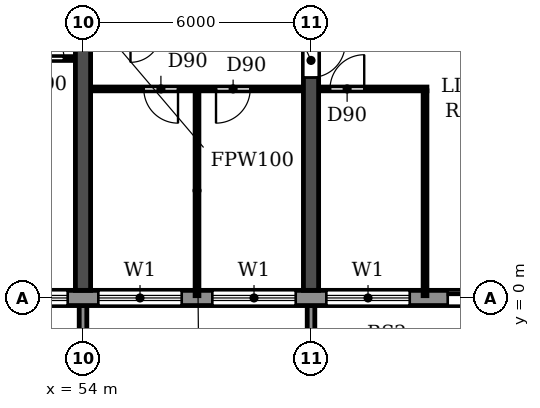
"""IFC4 building model, lengths in metres.
Left out: names, types, materials, properties, quantities, classifications, styles, units other than length and angle.
Written with IfcOpenShell. Run it as: python <this file> out.ifc"""

import sys

from ifc_helpers import new_model, si_unit, direction, frame, frame_2d, origin, place, context, subcontext, project, spatial, polyline, rectangle, outline, extrude, source, transform, mapped, element, fill, save


model = new_model("IFC4")
c1 = context("Model", 3, precision=1e-05, world=origin(), true_north=direction((0.0, 1.0)))
c2 = subcontext(c1, "Body", "Model", "MODEL_VIEW")
j1 = project(units=[si_unit("LENGTHUNIT", "METRE"), si_unit("PLANEANGLEUNIT", "RADIAN")], contexts=[c1])
p1 = place(None, origin())
s1 = spatial("IfcSite", under=j1, at=p1, CompositionType="ELEMENT")
p2 = place(p1, origin())
s2 = spatial("IfcBuilding", under=s1, at=p2, CompositionType="ELEMENT")
p3 = place(p2, frame((0.0, 0.0, 23.4)))
s3 = spatial("IfcBuildingStorey", under=s2, at=p3, CompositionType="ELEMENT", Elevation=23.4)
p4 = place(p3, frame((54.0, 0.2, 0.0), z_axis=(0.0, 0.0, 1.0), x_axis=(0.0, 1.0, 0.0)))
e1 = element("IfcWall", 1, at=p4, inside=s3, PredefinedType="SHEAR", context=c2, shape_type="SweptSolid", body=[
    extrude(rectangle(XDim=11.65, YDim=0.4, at=frame_2d((5.825, 0.0))), origin(), (0.0, 0.0, 1.0), 3.05),
])
p5 = place(p3, frame((60.0, 0.2, 0.0), z_axis=(0.0, 0.0, 1.0), x_axis=(0.0, 1.0, 0.0)))
e2 = element("IfcWall", 2, at=p5, inside=s3, PredefinedType="SHEAR", context=c2, shape_type="SweptSolid", body=[
    extrude(rectangle(XDim=11.65, YDim=0.4, at=frame_2d((5.825, 0.0))), origin(), (0.0, 0.0, 1.0), 3.05),
])
p6 = place(p5, frame((5.6, 0.0, 0.0)))
e3 = element("IfcOpeningElement", 3, at=p6, cuts=e2, PredefinedType="OPENING", context=c2, shape_type="SweptSolid", body=[
    extrude(rectangle(XDim=0.9, YDim=2.1, at=frame_2d((0.45, 1.05))), frame((0.0, 0.21, 0.0), z_axis=(0.0, -1.0, 0.0), x_axis=(1.0, 0.0, 0.0)), (0.0, 0.0, 1.0), 0.42),
])
p7 = place(p3, frame((4.683, 0.0, 0.0), z_axis=(0.0, 0.0, 1.0), x_axis=(1.0, 0.0, 0.0)))
e4 = element("IfcWall", 4, at=p7, inside=s3, PredefinedType="STANDARD", context=c2, shape_type="SweptSolid", body=[
    extrude(rectangle(XDim=92.634, YDim=0.4, at=frame_2d((46.317, 0.0))), origin(), (0.0, 0.0, 1.0), 3.05),
])
p8 = place(p7, frame((1.717, 0.0, 0.9)))
e5 = element("IfcOpeningElement", 5, at=p8, cuts=e4, PredefinedType="OPENING", context=c2, shape_type="SweptSolid", body=[
    extrude(rectangle(XDim=2.2, YDim=1.5, at=frame_2d((1.1, 0.75))), frame((0.0, 0.21, 0.0), z_axis=(0.0, -1.0, 0.0), x_axis=(1.0, 0.0, 0.0)), (0.0, 0.0, 1.0), 0.42),
])
p9 = place(p7, frame((4.717, 0.0, 0.9)))
e6 = element("IfcOpeningElement", 6, at=p9, cuts=e4, PredefinedType="OPENING", context=c2, shape_type="SweptSolid", body=[
    extrude(rectangle(XDim=2.2, YDim=1.5, at=frame_2d((1.1, 0.75))), frame((0.0, 0.21, 0.0), z_axis=(0.0, -1.0, 0.0), x_axis=(1.0, 0.0, 0.0)), (0.0, 0.0, 1.0), 0.42),
])
p10 = place(p7, frame((7.717, 0.0, 0.9)))
e7 = element("IfcOpeningElement", 7, at=p10, cuts=e4, PredefinedType="OPENING", context=c2, shape_type="SweptSolid", body=[
    extrude(rectangle(XDim=2.2, YDim=1.5, at=frame_2d((1.1, 0.75))), frame((0.0, 0.21, 0.0), z_axis=(0.0, -1.0, 0.0), x_axis=(1.0, 0.0, 0.0)), (0.0, 0.0, 1.0), 0.42),
])
p11 = place(p7, frame((10.717, 0.0, 0.9)))
e8 = element("IfcOpeningElement", 8, at=p11, cuts=e4, PredefinedType="OPENING", context=c2, shape_type="SweptSolid", body=[
    extrude(rectangle(XDim=2.2, YDim=1.5, at=frame_2d((1.1, 0.75))), frame((0.0, 0.21, 0.0), z_axis=(0.0, -1.0, 0.0), x_axis=(1.0, 0.0, 0.0)), (0.0, 0.0, 1.0), 0.42),
])
p12 = place(p7, frame((13.717, 0.0, 0.9)))
e9 = element("IfcOpeningElement", 9, at=p12, cuts=e4, PredefinedType="OPENING", context=c2, shape_type="SweptSolid", body=[
    extrude(rectangle(XDim=2.2, YDim=1.5, at=frame_2d((1.1, 0.75))), frame((0.0, 0.21, 0.0), z_axis=(0.0, -1.0, 0.0), x_axis=(1.0, 0.0, 0.0)), (0.0, 0.0, 1.0), 0.42),
])
p13 = place(p7, frame((16.717, 0.0, 0.9)))
e10 = element("IfcOpeningElement", 10, at=p13, cuts=e4, PredefinedType="OPENING", context=c2, shape_type="SweptSolid", body=[
    extrude(rectangle(XDim=2.2, YDim=1.5, at=frame_2d((1.1, 0.75))), frame((0.0, 0.21, 0.0), z_axis=(0.0, -1.0, 0.0), x_axis=(1.0, 0.0, 0.0)), (0.0, 0.0, 1.0), 0.42),
])
p14 = place(p7, frame((19.917, 0.0, 0.0)))
e11 = element("IfcOpeningElement", 11, at=p14, cuts=e4, PredefinedType="OPENING", context=c2, shape_type="SweptSolid", body=[
    extrude(rectangle(XDim=1.8, YDim=2.4, at=frame_2d((0.9, 1.2))), frame((0.0, 0.21, 0.0), z_axis=(0.0, -1.0, 0.0), x_axis=(1.0, 0.0, 0.0)), (0.0, 0.0, 1.0), 0.42),
])
p15 = place(p7, frame((22.717, 0.0, 0.9)))
e12 = element("IfcOpeningElement", 12, at=p15, cuts=e4, PredefinedType="OPENING", context=c2, shape_type="SweptSolid", body=[
    extrude(rectangle(XDim=2.2, YDim=1.5, at=frame_2d((1.1, 0.75))), frame((0.0, 0.21, 0.0), z_axis=(0.0, -1.0, 0.0), x_axis=(1.0, 0.0, 0.0)), (0.0, 0.0, 1.0), 0.42),
])
p16 = place(p7, frame((25.717, 0.0, 0.9)))
e13 = element("IfcOpeningElement", 13, at=p16, cuts=e4, PredefinedType="OPENING", context=c2, shape_type="SweptSolid", body=[
    extrude(rectangle(XDim=2.2, YDim=1.5, at=frame_2d((1.1, 0.75))), frame((0.0, 0.21, 0.0), z_axis=(0.0, -1.0, 0.0), x_axis=(1.0, 0.0, 0.0)), (0.0, 0.0, 1.0), 0.42),
])
p17 = place(p7, frame((28.717, 0.0, 0.9)))
e14 = element("IfcOpeningElement", 14, at=p17, cuts=e4, PredefinedType="OPENING", context=c2, shape_type="SweptSolid", body=[
    extrude(rectangle(XDim=2.2, YDim=1.5, at=frame_2d((1.1, 0.75))), frame((0.0, 0.21, 0.0), z_axis=(0.0, -1.0, 0.0), x_axis=(1.0, 0.0, 0.0)), (0.0, 0.0, 1.0), 0.42),
])
p18 = place(p7, frame((31.917, 0.0, 0.0)))
e15 = element("IfcOpeningElement", 15, at=p18, cuts=e4, PredefinedType="OPENING", context=c2, shape_type="SweptSolid", body=[
    extrude(rectangle(XDim=1.8, YDim=2.4, at=frame_2d((0.9, 1.2))), frame((0.0, 0.21, 0.0), z_axis=(0.0, -1.0, 0.0), x_axis=(1.0, 0.0, 0.0)), (0.0, 0.0, 1.0), 0.42),
])
p19 = place(p7, frame((34.717, 0.0, 0.9)))
e16 = element("IfcOpeningElement", 16, at=p19, cuts=e4, PredefinedType="OPENING", context=c2, shape_type="SweptSolid", body=[
    extrude(rectangle(XDim=2.2, YDim=1.5, at=frame_2d((1.1, 0.75))), frame((0.0, 0.21, 0.0), z_axis=(0.0, -1.0, 0.0), x_axis=(1.0, 0.0, 0.0)), (0.0, 0.0, 1.0), 0.42),
])
p20 = place(p7, frame((37.717, 0.0, 0.9)))
e17 = element("IfcOpeningElement", 17, at=p20, cuts=e4, PredefinedType="OPENING", context=c2, shape_type="SweptSolid", body=[
    extrude(rectangle(XDim=2.2, YDim=1.5, at=frame_2d((1.1, 0.75))), frame((0.0, 0.21, 0.0), z_axis=(0.0, -1.0, 0.0), x_axis=(1.0, 0.0, 0.0)), (0.0, 0.0, 1.0), 0.42),
])
p21 = place(p7, frame((40.717, 0.0, 0.9)))
e18 = element("IfcOpeningElement", 18, at=p21, cuts=e4, PredefinedType="OPENING", context=c2, shape_type="SweptSolid", body=[
    extrude(rectangle(XDim=2.2, YDim=1.5, at=frame_2d((1.1, 0.75))), frame((0.0, 0.21, 0.0), z_axis=(0.0, -1.0, 0.0), x_axis=(1.0, 0.0, 0.0)), (0.0, 0.0, 1.0), 0.42),
])
p22 = place(p7, frame((43.917, 0.0, 0.0)))
e19 = element("IfcOpeningElement", 19, at=p22, cuts=e4, PredefinedType="OPENING", context=c2, shape_type="SweptSolid", body=[
    extrude(rectangle(XDim=1.8, YDim=2.4, at=frame_2d((0.9, 1.2))), frame((0.0, 0.21, 0.0), z_axis=(0.0, -1.0, 0.0), x_axis=(1.0, 0.0, 0.0)), (0.0, 0.0, 1.0), 0.42),
])
p23 = place(p7, frame((46.717, 0.0, 0.9)))
e20 = element("IfcOpeningElement", 20, at=p23, cuts=e4, PredefinedType="OPENING", context=c2, shape_type="SweptSolid", body=[
    extrude(rectangle(XDim=2.2, YDim=1.5, at=frame_2d((1.1, 0.75))), frame((0.0, 0.21, 0.0), z_axis=(0.0, -1.0, 0.0), x_axis=(1.0, 0.0, 0.0)), (0.0, 0.0, 1.0), 0.42),
])
p24 = place(p7, frame((49.717, 0.0, 0.9)))
e21 = element("IfcOpeningElement", 21, at=p24, cuts=e4, PredefinedType="OPENING", context=c2, shape_type="SweptSolid", body=[
    extrude(rectangle(XDim=2.2, YDim=1.5, at=frame_2d((1.1, 0.75))), frame((0.0, 0.21, 0.0), z_axis=(0.0, -1.0, 0.0), x_axis=(1.0, 0.0, 0.0)), (0.0, 0.0, 1.0), 0.42),
])
p25 = place(p7, frame((52.717, 0.0, 0.9)))
e22 = element("IfcOpeningElement", 22, at=p25, cuts=e4, PredefinedType="OPENING", context=c2, shape_type="SweptSolid", body=[
    extrude(rectangle(XDim=2.2, YDim=1.5, at=frame_2d((1.1, 0.75))), frame((0.0, 0.21, 0.0), z_axis=(0.0, -1.0, 0.0), x_axis=(1.0, 0.0, 0.0)), (0.0, 0.0, 1.0), 0.42),
])
p26 = place(p7, frame((55.717, 0.0, 0.9)))
e23 = element("IfcOpeningElement", 23, at=p26, cuts=e4, PredefinedType="OPENING", context=c2, shape_type="SweptSolid", body=[
    extrude(rectangle(XDim=2.2, YDim=1.5, at=frame_2d((1.1, 0.75))), frame((0.0, 0.21, 0.0), z_axis=(0.0, -1.0, 0.0), x_axis=(1.0, 0.0, 0.0)), (0.0, 0.0, 1.0), 0.42),
])
p27 = place(p7, frame((58.917, 0.0, 0.0)))
e24 = element("IfcOpeningElement", 24, at=p27, cuts=e4, PredefinedType="OPENING", context=c2, shape_type="SweptSolid", body=[
    extrude(rectangle(XDim=1.8, YDim=2.4, at=frame_2d((0.9, 1.2))), frame((0.0, 0.21, 0.0), z_axis=(0.0, -1.0, 0.0), x_axis=(1.0, 0.0, 0.0)), (0.0, 0.0, 1.0), 0.42),
])
p28 = place(p7, frame((61.717, 0.0, 0.9)))
e25 = element("IfcOpeningElement", 25, at=p28, cuts=e4, PredefinedType="OPENING", context=c2, shape_type="SweptSolid", body=[
    extrude(rectangle(XDim=2.2, YDim=1.5, at=frame_2d((1.1, 0.75))), frame((0.0, 0.21, 0.0), z_axis=(0.0, -1.0, 0.0), x_axis=(1.0, 0.0, 0.0)), (0.0, 0.0, 1.0), 0.42),
])
p29 = place(p7, frame((64.717, 0.0, 0.9)))
e26 = element("IfcOpeningElement", 26, at=p29, cuts=e4, PredefinedType="OPENING", context=c2, shape_type="SweptSolid", body=[
    extrude(rectangle(XDim=2.2, YDim=1.5, at=frame_2d((1.1, 0.75))), frame((0.0, 0.21, 0.0), z_axis=(0.0, -1.0, 0.0), x_axis=(1.0, 0.0, 0.0)), (0.0, 0.0, 1.0), 0.42),
])
p30 = place(p7, frame((67.717, 0.0, 0.9)))
e27 = element("IfcOpeningElement", 27, at=p30, cuts=e4, PredefinedType="OPENING", context=c2, shape_type="SweptSolid", body=[
    extrude(rectangle(XDim=2.2, YDim=1.5, at=frame_2d((1.1, 0.75))), frame((0.0, 0.21, 0.0), z_axis=(0.0, -1.0, 0.0), x_axis=(1.0, 0.0, 0.0)), (0.0, 0.0, 1.0), 0.42),
])
p31 = place(p7, frame((70.917, 0.0, 0.0)))
e28 = element("IfcOpeningElement", 28, at=p31, cuts=e4, PredefinedType="OPENING", context=c2, shape_type="SweptSolid", body=[
    extrude(rectangle(XDim=1.8, YDim=2.4, at=frame_2d((0.9, 1.2))), frame((0.0, 0.21, 0.0), z_axis=(0.0, -1.0, 0.0), x_axis=(1.0, 0.0, 0.0)), (0.0, 0.0, 1.0), 0.42),
])
p32 = place(p7, frame((73.717, 0.0, 0.9)))
e29 = element("IfcOpeningElement", 29, at=p32, cuts=e4, PredefinedType="OPENING", context=c2, shape_type="SweptSolid", body=[
    extrude(rectangle(XDim=2.2, YDim=1.5, at=frame_2d((1.1, 0.75))), frame((0.0, 0.21, 0.0), z_axis=(0.0, -1.0, 0.0), x_axis=(1.0, 0.0, 0.0)), (0.0, 0.0, 1.0), 0.42),
])
p33 = place(p7, frame((76.717, 0.0, 0.9)))
e30 = element("IfcOpeningElement", 30, at=p33, cuts=e4, PredefinedType="OPENING", context=c2, shape_type="SweptSolid", body=[
    extrude(rectangle(XDim=2.2, YDim=1.5, at=frame_2d((1.1, 0.75))), frame((0.0, 0.21, 0.0), z_axis=(0.0, -1.0, 0.0), x_axis=(1.0, 0.0, 0.0)), (0.0, 0.0, 1.0), 0.42),
])
p34 = place(p7, frame((79.717, 0.0, 0.9)))
e31 = element("IfcOpeningElement", 31, at=p34, cuts=e4, PredefinedType="OPENING", context=c2, shape_type="SweptSolid", body=[
    extrude(rectangle(XDim=2.2, YDim=1.5, at=frame_2d((1.1, 0.75))), frame((0.0, 0.21, 0.0), z_axis=(0.0, -1.0, 0.0), x_axis=(1.0, 0.0, 0.0)), (0.0, 0.0, 1.0), 0.42),
])
p35 = place(p7, frame((82.717, 0.0, 0.9)))
e32 = element("IfcOpeningElement", 32, at=p35, cuts=e4, PredefinedType="OPENING", context=c2, shape_type="SweptSolid", body=[
    extrude(rectangle(XDim=2.2, YDim=1.5, at=frame_2d((1.1, 0.75))), frame((0.0, 0.21, 0.0), z_axis=(0.0, -1.0, 0.0), x_axis=(1.0, 0.0, 0.0)), (0.0, 0.0, 1.0), 0.42),
])
p36 = place(p7, frame((85.717, 0.0, 0.9)))
e33 = element("IfcOpeningElement", 33, at=p36, cuts=e4, PredefinedType="OPENING", context=c2, shape_type="SweptSolid", body=[
    extrude(rectangle(XDim=2.2, YDim=1.5, at=frame_2d((1.1, 0.75))), frame((0.0, 0.21, 0.0), z_axis=(0.0, -1.0, 0.0), x_axis=(1.0, 0.0, 0.0)), (0.0, 0.0, 1.0), 0.42),
])
p37 = place(p7, frame((88.717, 0.0, 0.9)))
e34 = element("IfcOpeningElement", 34, at=p37, cuts=e4, PredefinedType="OPENING", context=c2, shape_type="SweptSolid", body=[
    extrude(rectangle(XDim=2.2, YDim=1.5, at=frame_2d((1.1, 0.75))), frame((0.0, 0.21, 0.0), z_axis=(0.0, -1.0, 0.0), x_axis=(1.0, 0.0, 0.0)), (0.0, 0.0, 1.0), 0.42),
])
m1 = source(origin(), c2, "Body", "SweptSolid", [
    extrude(outline(polyline([(0.0, 0.0), (0.2, 0.0), (0.2, 1.65), (0.0, 1.65), (0.0, 0.0)])), origin(), (0.0, 0.0, 1.0), 3.1),
])
for number, where in (
    (35, (53.9, -1.85, 0.0)),
    (36, (59.9, -1.85, 0.0)),
):
    element("IfcWall", number, at=place(p3, frame(where)), inside=s3, PredefinedType="STANDARD", context=c2, shape_type="MappedRepresentation", body=[
        mapped(m1, transform((0.0, 0.0, 0.0))),
    ])
p38 = place(p3, frame((54.21, 5.5, 0.0), z_axis=(0.0, 0.0, 1.0), x_axis=(1.0, 0.0, 0.0)))
e37 = element("IfcWall", 37, at=p38, inside=s3, PredefinedType="PARTITIONING", context=c2, shape_type="SweptSolid", body=[
    extrude(rectangle(XDim=5.58, YDim=0.1, at=frame_2d((2.79, 0.0))), origin(), (0.0, 0.0, 1.0), 3.05),
])
p39 = place(p38, frame((1.39, 0.0, 0.0)))
e38 = element("IfcOpeningElement", 38, at=p39, cuts=e37, PredefinedType="OPENING", context=c2, shape_type="SweptSolid", body=[
    extrude(rectangle(XDim=0.9, YDim=2.1, at=frame_2d((0.45, 1.05))), frame((0.0, 0.06, 0.0), z_axis=(0.0, -1.0, 0.0), x_axis=(1.0, 0.0, 0.0)), (0.0, 0.0, 1.0), 0.12),
])
p40 = place(p38, frame((3.29, 0.0, 0.0)))
e39 = element("IfcOpeningElement", 39, at=p40, cuts=e37, PredefinedType="OPENING", context=c2, shape_type="SweptSolid", body=[
    extrude(rectangle(XDim=0.9, YDim=2.1, at=frame_2d((0.45, 1.05))), frame((0.0, 0.06, 0.0), z_axis=(0.0, -1.0, 0.0), x_axis=(1.0, 0.0, 0.0)), (0.0, 0.0, 1.0), 0.12),
])
p41 = place(p3, frame((60.21, 5.5, 0.0), z_axis=(0.0, 0.0, 1.0), x_axis=(1.0, 0.0, 0.0)))
e40 = element("IfcWall", 40, at=p41, inside=s3, PredefinedType="PARTITIONING", context=c2, shape_type="SweptSolid", body=[
    extrude(rectangle(XDim=2.84, YDim=0.1, at=frame_2d((1.42, 0.0))), origin(), (0.0, 0.0, 1.0), 3.05),
])
p42 = place(p41, frame((0.29, 0.0, 0.0)))
e41 = element("IfcOpeningElement", 41, at=p42, cuts=e40, PredefinedType="OPENING", context=c2, shape_type="SweptSolid", body=[
    extrude(rectangle(XDim=0.9, YDim=2.1, at=frame_2d((0.45, 1.05))), frame((0.0, 0.06, 0.0), z_axis=(0.0, -1.0, 0.0), x_axis=(1.0, 0.0, 0.0)), (0.0, 0.0, 1.0), 0.12),
])
p43 = place(p3, frame((50.95, 6.3, 0.0), z_axis=(0.0, 0.0, 1.0), x_axis=(1.0, 0.0, 0.0)))
e42 = element("IfcWall", 42, at=p43, inside=s3, PredefinedType="PARTITIONING", context=c2, shape_type="SweptSolid", body=[
    extrude(rectangle(XDim=2.84, YDim=0.1, at=frame_2d((1.42, 0.0))), origin(), (0.0, 0.0, 1.0), 3.05),
])
p44 = place(p43, frame((1.65, 0.0, 0.0)))
e43 = element("IfcOpeningElement", 43, at=p44, cuts=e42, PredefinedType="OPENING", context=c2, shape_type="SweptSolid", body=[
    extrude(rectangle(XDim=0.9, YDim=2.1, at=frame_2d((0.45, 1.05))), frame((0.0, 0.06, 0.0), z_axis=(0.0, -1.0, 0.0), x_axis=(1.0, 0.0, 0.0)), (0.0, 0.0, 1.0), 0.12),
])
for number, where, z_axis, x_axis in (
    (44, (57.0, 0.06, 0.0), (0.0, 0.0, 1.0), (0.0, 1.0, 0.0)),
    (45, (63.0, 0.06, 0.0), (0.0, 0.0, 1.0), (0.0, 1.0, 0.0)),
):
    element("IfcWall", number, at=place(p3, frame(where, z_axis=z_axis, x_axis=x_axis)), inside=s3, PredefinedType="PARTITIONING", context=c2, shape_type="SweptSolid", body=[
        extrude(rectangle(XDim=5.39, YDim=0.1, at=frame_2d((2.695, 0.0))), origin(), (0.0, 0.0, 1.0), 3.05),
    ])
p45 = place(p23, origin())
e46 = element("IfcWindow", 46, at=p45, inside=s3, PartitioningType="DOUBLE_PANEL_HORIZONTAL", PredefinedType="WINDOW", context=c2, shape_type="SweptSolid", body=[
    extrude(rectangle(XDim=2.2, YDim=1.5, at=frame_2d((1.1, 0.75))), frame((0.0, 0.03, 0.0), z_axis=(0.0, -1.0, 0.0), x_axis=(1.0, 0.0, 0.0)), (0.0, 0.0, 1.0), 0.06),
])
fill(e20, e46)
p46 = place(p24, origin())
e47 = element("IfcWindow", 47, at=p46, inside=s3, PartitioningType="DOUBLE_PANEL_HORIZONTAL", PredefinedType="WINDOW", context=c2, shape_type="SweptSolid", body=[
    extrude(rectangle(XDim=2.2, YDim=1.5, at=frame_2d((1.1, 0.75))), frame((0.0, 0.03, 0.0), z_axis=(0.0, -1.0, 0.0), x_axis=(1.0, 0.0, 0.0)), (0.0, 0.0, 1.0), 0.06),
])
fill(e21, e47)
p47 = place(p25, origin())
e48 = element("IfcWindow", 48, at=p47, inside=s3, PartitioningType="DOUBLE_PANEL_HORIZONTAL", PredefinedType="WINDOW", context=c2, shape_type="SweptSolid", body=[
    extrude(rectangle(XDim=2.2, YDim=1.5, at=frame_2d((1.1, 0.75))), frame((0.0, 0.03, 0.0), z_axis=(0.0, -1.0, 0.0), x_axis=(1.0, 0.0, 0.0)), (0.0, 0.0, 1.0), 0.06),
])
fill(e22, e48)
p48 = place(p26, origin())
e49 = element("IfcWindow", 49, at=p48, inside=s3, PartitioningType="DOUBLE_PANEL_HORIZONTAL", PredefinedType="WINDOW", context=c2, shape_type="SweptSolid", body=[
    extrude(rectangle(XDim=2.2, YDim=1.5, at=frame_2d((1.1, 0.75))), frame((0.0, 0.03, 0.0), z_axis=(0.0, -1.0, 0.0), x_axis=(1.0, 0.0, 0.0)), (0.0, 0.0, 1.0), 0.06),
])
fill(e23, e49)
p49 = place(p27, origin())
e50 = element("IfcDoor", 50, at=p49, inside=s3, OperationType="DOUBLE_DOOR_SLIDING", PredefinedType="DOOR", context=c2, shape_type="SweptSolid", body=[
    extrude(rectangle(XDim=1.8, YDim=2.4, at=frame_2d((0.9, 1.2))), frame((0.0, 0.025, 0.0), z_axis=(0.0, -1.0, 0.0), x_axis=(1.0, 0.0, 0.0)), (0.0, 0.0, 1.0), 0.05),
])
fill(e24, e50)
p50 = place(p44, origin())
e51 = element("IfcDoor", 51, at=p50, inside=s3, OperationType="SINGLE_SWING_LEFT", PredefinedType="DOOR", context=c2, shape_type="SweptSolid", body=[
    extrude(rectangle(XDim=0.9, YDim=2.1, at=frame_2d((0.45, 1.05))), frame((0.0, 0.025, 0.0), z_axis=(0.0, -1.0, 0.0), x_axis=(1.0, 0.0, 0.0)), (0.0, 0.0, 1.0), 0.05),
])
fill(e43, e51)
p51 = place(p39, frame((0.9, 0.0, 0.0), z_axis=(0.0, 0.0, 1.0), x_axis=(-1.0, 0.0, 0.0)))
e52 = element("IfcDoor", 52, at=p51, inside=s3, OperationType="SINGLE_SWING_LEFT", PredefinedType="DOOR", context=c2, shape_type="SweptSolid", body=[
    extrude(rectangle(XDim=0.9, YDim=2.1, at=frame_2d((0.45, 1.05))), frame((0.0, 0.025, 0.0), z_axis=(0.0, -1.0, 0.0), x_axis=(1.0, 0.0, 0.0)), (0.0, 0.0, 1.0), 0.05),
])
fill(e38, e52)
p52 = place(p40, frame((0.9, 0.0, 0.0), z_axis=(0.0, 0.0, 1.0), x_axis=(-1.0, 0.0, 0.0)))
e53 = element("IfcDoor", 53, at=p52, inside=s3, OperationType="SINGLE_SWING_RIGHT", PredefinedType="DOOR", context=c2, shape_type="SweptSolid", body=[
    extrude(rectangle(XDim=0.9, YDim=2.1, at=frame_2d((0.45, 1.05))), frame((0.0, 0.025, 0.0), z_axis=(0.0, -1.0, 0.0), x_axis=(1.0, 0.0, 0.0)), (0.0, 0.0, 1.0), 0.05),
])
fill(e39, e53)
p53 = place(p6, frame((0.9, 0.0, 0.0), z_axis=(0.0, 0.0, 1.0), x_axis=(-1.0, 0.0, 0.0)))
e54 = element("IfcDoor", 54, at=p53, inside=s3, OperationType="SINGLE_SWING_LEFT", PredefinedType="DOOR", context=c2, shape_type="SweptSolid", body=[
    extrude(rectangle(XDim=0.9, YDim=2.1, at=frame_2d((0.45, 1.05))), frame((0.0, 0.025, 0.0), z_axis=(0.0, -1.0, 0.0), x_axis=(1.0, 0.0, 0.0)), (0.0, 0.0, 1.0), 0.05),
])
fill(e3, e54)
p54 = place(p42, origin())
e55 = element("IfcDoor", 55, at=p54, inside=s3, OperationType="SINGLE_SWING_RIGHT", PredefinedType="DOOR", context=c2, shape_type="SweptSolid", body=[
    extrude(rectangle(XDim=0.9, YDim=2.1, at=frame_2d((0.45, 1.05))), frame((0.0, 0.025, 0.0), z_axis=(0.0, -1.0, 0.0), x_axis=(1.0, 0.0, 0.0)), (0.0, 0.0, 1.0), 0.05),
])
fill(e41, e55)
save(model, sys.argv[1])
